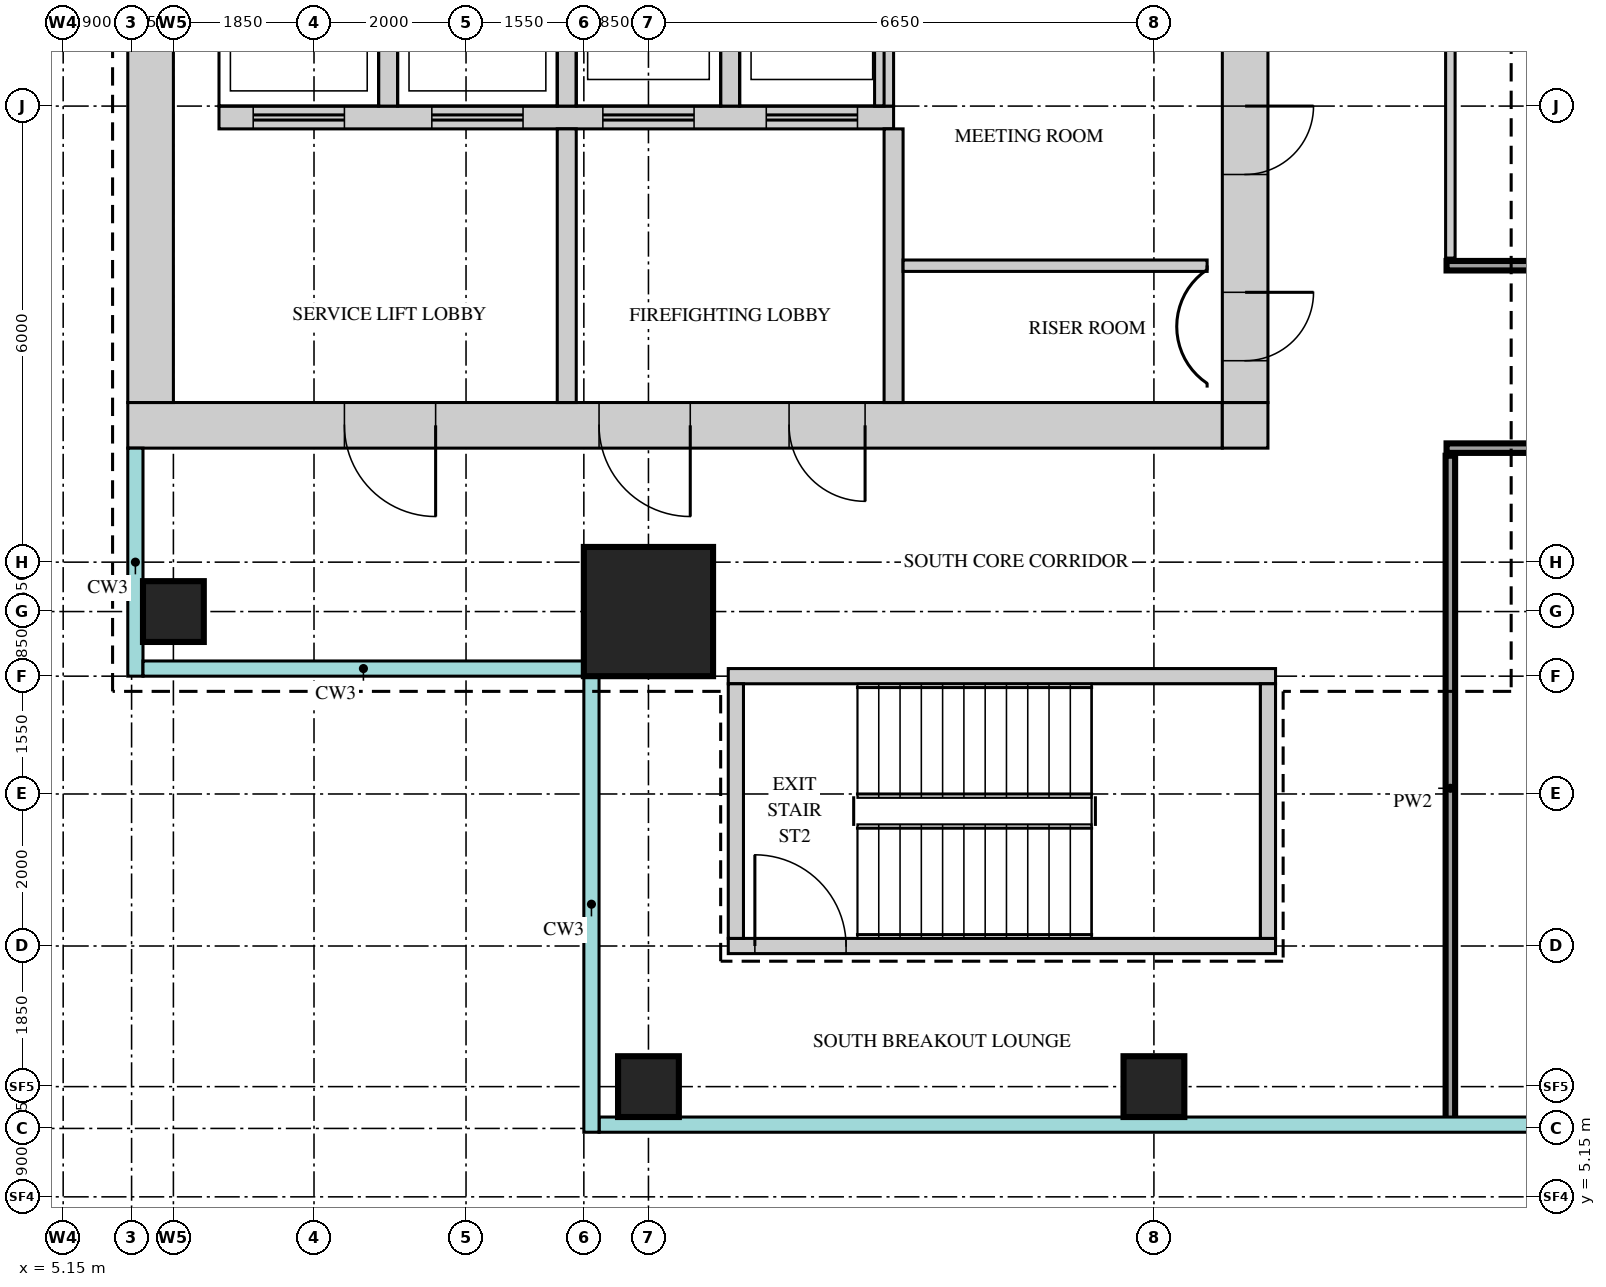
"""IFC4 building model, lengths in metres.
Left out: names, types, materials, properties, quantities, classifications, styles, units other than length and angle.
Written with IfcOpenShell. Run it as: python <this file> out.ifc"""

import sys

from ifc_helpers import new_model, si_unit, direction, frame, frame_2d, origin, origin_2d, place, context, subcontext, project, spatial, rectangle, extrude, source, transform, mapped, element, fill, save


model = new_model("IFC4")
c1 = context("Model", 3, precision=1e-05, world=origin(), true_north=direction((0.0, 1.0)))
c2 = subcontext(c1, "Body", "Model", "MODEL_VIEW")
j1 = project(units=[si_unit("LENGTHUNIT", "METRE"), si_unit("PLANEANGLEUNIT", "RADIAN")], contexts=[c1])
p1 = place(None, origin())
s1 = spatial("IfcSite", under=j1, at=p1, CompositionType="ELEMENT")
p2 = place(p1, origin())
s2 = spatial("IfcBuilding", under=s1, at=p2, CompositionType="ELEMENT")
p3 = place(p2, frame((0.0, 0.0, 314.2)))
s3 = spatial("IfcBuildingStorey", under=s2, at=p3, CompositionType="ELEMENT", Elevation=314.2)
m1 = source(origin(), c2, "Body", "SweptSolid", [
    extrude(rectangle(XDim=14.4, YDim=0.6, at=frame_2d((7.2, 0.0))), origin(), (0.0, 0.0, 1.0), 3.75),
])
p4 = place(p3, frame((6.0, 15.3, 0.0), z_axis=(0.0, 0.0, 1.0), x_axis=(1.0, 0.0, 0.0)))
e1 = element("IfcWall", 1, at=p4, inside=s3, PredefinedType="SHEAR", context=c2, shape_type="MappedRepresentation", body=[
    mapped(m1, transform((0.0, 0.0, 0.0))),
])
m2 = source(origin(), c2, "Body", "SweptSolid", [
    extrude(rectangle(XDim=1.2, YDim=2.1, at=frame_2d((0.6, 1.05))), frame((0.0, 0.31, 0.0), z_axis=(0.0, -1.0, 0.0), x_axis=(1.0, 0.0, 0.0)), (0.0, 0.0, 1.0), 0.62),
])
p5 = place(p4, frame((6.2, 0.0, 0.0)))
e2 = element("IfcOpeningElement", 2, at=p5, cuts=e1, PredefinedType="OPENING", context=c2, shape_type="MappedRepresentation", body=[
    mapped(m2, transform((0.0, 0.0, 0.0))),
])
p6 = place(p4, frame((2.85, 0.0, 0.0)))
e3 = element("IfcOpeningElement", 3, at=p6, cuts=e1, PredefinedType="OPENING", context=c2, shape_type="MappedRepresentation", body=[
    mapped(m2, transform((0.0, 0.0, 0.0))),
])
m3 = source(origin(), c2, "Body", "SweptSolid", [
    extrude(rectangle(XDim=1.0, YDim=2.1, at=frame_2d((0.5, 1.05))), frame((0.0, 0.31, 0.0), z_axis=(0.0, -1.0, 0.0), x_axis=(1.0, 0.0, 0.0)), (0.0, 0.0, 1.0), 0.62),
])
p7 = place(p4, frame((8.7, 0.0, 0.0)))
e4 = element("IfcOpeningElement", 4, at=p7, cuts=e1, PredefinedType="OPENING", context=c2, shape_type="MappedRepresentation", body=[
    mapped(m3, transform((0.0, 0.0, 0.0))),
])
m4 = source(origin(), c2, "Body", "SweptSolid", [
    extrude(rectangle(XDim=0.6, YDim=0.6, at=frame_2d((0.3, 0.0))), origin(), (0.0, 0.0, 1.0), 3.75),
])
p8 = place(p3, frame((20.4, 15.3, 0.0), z_axis=(0.0, 0.0, 1.0), x_axis=(1.0, 0.0, 0.0)))
e5 = element("IfcWall", 5, at=p8, inside=s3, PredefinedType="SHEAR", context=c2, shape_type="MappedRepresentation", body=[
    mapped(m4, transform((0.0, 0.0, 0.0))),
])
m5 = source(origin(), c2, "Body", "SweptSolid", [
    extrude(rectangle(XDim=22.8, YDim=0.6, at=frame_2d((11.4, 0.0))), origin(), (0.0, 0.0, 1.0), 3.75),
])
p9 = place(p3, frame((20.7, 15.6, 0.0), z_axis=(0.0, 0.0, 1.0), x_axis=(0.0, 1.0, 0.0)))
e6 = element("IfcWall", 6, at=p9, inside=s3, PredefinedType="SHEAR", context=c2, shape_type="MappedRepresentation", body=[
    mapped(m5, transform((0.0, 0.0, 0.0))),
])
m6 = source(origin(), c2, "Body", "SweptSolid", [
    extrude(rectangle(XDim=1.8, YDim=2.1, at=frame_2d((0.9, 1.05))), frame((0.0, 0.31, 0.0), z_axis=(0.0, -1.0, 0.0), x_axis=(1.0, 0.0, 0.0)), (0.0, 0.0, 1.0), 0.62),
])
p10 = place(p9, frame((10.9, 0.0, 0.0)))
e7 = element("IfcOpeningElement", 7, at=p10, cuts=e6, PredefinedType="OPENING", context=c2, shape_type="MappedRepresentation", body=[
    mapped(m6, transform((0.0, 0.0, 0.0))),
])
m7 = source(origin(), c2, "Body", "SweptSolid", [
    extrude(rectangle(XDim=0.9, YDim=2.1, at=frame_2d((0.45, 1.05))), frame((0.0, 0.31, 0.0), z_axis=(0.0, -1.0, 0.0), x_axis=(1.0, 0.0, 0.0)), (0.0, 0.0, 1.0), 0.62),
])
p11 = place(p9, frame((0.55, 0.0, 0.0)))
e8 = element("IfcOpeningElement", 8, at=p11, cuts=e6, PredefinedType="OPENING", context=c2, shape_type="MappedRepresentation", body=[
    mapped(m7, transform((0.0, 0.0, 0.0))),
])
p12 = place(p9, frame((3.0, 0.0, 0.0)))
e9 = element("IfcOpeningElement", 9, at=p12, cuts=e6, PredefinedType="OPENING", context=c2, shape_type="MappedRepresentation", body=[
    mapped(m7, transform((0.0, 0.0, 0.0))),
])
p13 = place(p9, frame((5.75, 0.0, 0.0)))
e10 = element("IfcOpeningElement", 10, at=p13, cuts=e6, PredefinedType="OPENING", context=c2, shape_type="MappedRepresentation", body=[
    mapped(m7, transform((0.0, 0.0, 0.0))),
])
p14 = place(p3, frame((6.3, 15.6, 0.0), z_axis=(0.0, 0.0, 1.0), x_axis=(0.0, 1.0, 0.0)))
e11 = element("IfcWall", 11, at=p14, inside=s3, PredefinedType="SHEAR", context=c2, shape_type="MappedRepresentation", body=[
    mapped(m5, transform((0.0, 0.0, 0.0))),
])
m8 = source(origin(), c2, "Body", "SweptSolid", [
    extrude(rectangle(XDim=7.2, YDim=0.2, at=frame_2d((3.6, 0.0))), origin(), (0.0, 0.0, 1.0), 3.75),
])
p15 = place(p3, frame((13.9, 12.0, 0.0), z_axis=(0.0, 0.0, 1.0), x_axis=(1.0, 0.0, 0.0)))
e12 = element("IfcWall", 12, at=p15, inside=s3, PredefinedType="SHEAR", context=c2, shape_type="MappedRepresentation", body=[
    mapped(m8, transform((0.0, 0.0, 0.0))),
])
p16 = place(p3, frame((13.9, 8.45, 0.0), z_axis=(0.0, 0.0, 1.0), x_axis=(1.0, 0.0, 0.0)))
e13 = element("IfcWall", 13, at=p16, inside=s3, PredefinedType="SHEAR", context=c2, shape_type="MappedRepresentation", body=[
    mapped(m8, transform((0.0, 0.0, 0.0))),
])
m9 = source(origin(), c2, "Body", "SweptSolid", [
    extrude(rectangle(XDim=1.2, YDim=2.1, at=frame_2d((0.6, 1.05))), frame((0.0, 0.11, 0.0), z_axis=(0.0, -1.0, 0.0), x_axis=(1.0, 0.0, 0.0)), (0.0, 0.0, 1.0), 0.22),
])
p17 = place(p16, frame((0.35, 0.0, 0.0)))
e14 = element("IfcOpeningElement", 14, at=p17, cuts=e13, PredefinedType="OPENING", context=c2, shape_type="MappedRepresentation", body=[
    mapped(m9, transform((0.0, 0.0, 0.0))),
])
m10 = source(origin(), c2, "Body", "SweptSolid", [
    extrude(rectangle(XDim=3.35, YDim=0.2, at=frame_2d((1.675, 0.0))), origin(), (0.0, 0.0, 1.0), 3.75),
])
for number, where, z_axis, x_axis in (
    (15, (21.0, 8.55, 0.0), (0.0, 0.0, 1.0), (0.0, 1.0, 0.0)),
    (16, (14.0, 8.55, 0.0), (0.0, 0.0, 1.0), (0.0, 1.0, 0.0)),
):
    element("IfcWall", number, at=place(p3, frame(where, z_axis=z_axis, x_axis=x_axis)), inside=s3, PredefinedType="SHEAR", context=c2, shape_type="MappedRepresentation", body=[
        mapped(m10, transform((0.0, 0.0, 0.0))),
    ])
m11 = source(origin(), c2, "Body", "SweptSolid", [
    extrude(rectangle(XDim=8.875, YDim=0.3, at=frame_2d((4.438, 0.0))), origin(), (0.0, 0.0, 1.0), 3.75),
])
p18 = place(p3, frame((7.2, 19.35, 0.0), z_axis=(0.0, 0.0, 1.0), x_axis=(1.0, 0.0, 0.0)))
e17 = element("IfcWall", 17, at=p18, inside=s3, PredefinedType="STANDARD", context=c2, shape_type="MappedRepresentation", body=[
    mapped(m11, transform((0.0, 0.0, 0.0))),
])
m12 = source(origin(), c2, "Body", "SweptSolid", [
    extrude(rectangle(XDim=1.2, YDim=2.1, at=frame_2d((0.6, 1.05))), frame((0.0, 0.16, 0.0), z_axis=(0.0, -1.0, 0.0), x_axis=(1.0, 0.0, 0.0)), (0.0, 0.0, 1.0), 0.32),
])
p19 = place(p18, frame((0.45, 0.0, 0.0)))
e18 = element("IfcOpeningElement", 18, at=p19, cuts=e17, PredefinedType="OPENING", context=c2, shape_type="MappedRepresentation", body=[
    mapped(m12, transform((0.0, 0.0, 0.0))),
])
p20 = place(p18, frame((2.8, 0.0, 0.0)))
e19 = element("IfcOpeningElement", 19, at=p20, cuts=e17, PredefinedType="OPENING", context=c2, shape_type="MappedRepresentation", body=[
    mapped(m12, transform((0.0, 0.0, 0.0))),
])
p21 = place(p18, frame((5.05, 0.0, 0.0)))
e20 = element("IfcOpeningElement", 20, at=p21, cuts=e17, PredefinedType="OPENING", context=c2, shape_type="MappedRepresentation", body=[
    mapped(m12, transform((0.0, 0.0, 0.0))),
])
p22 = place(p18, frame((7.2, 0.0, 0.0)))
e21 = element("IfcOpeningElement", 21, at=p22, cuts=e17, PredefinedType="OPENING", context=c2, shape_type="MappedRepresentation", body=[
    mapped(m12, transform((0.0, 0.0, 0.0))),
])
m13 = source(origin(), c2, "Body", "SweptSolid", [
    extrude(rectangle(XDim=3.1, YDim=0.25, at=frame_2d((1.55, 0.0))), origin(), (0.0, 0.0, 1.0), 3.75),
])
for number, where, z_axis, x_axis in (
    (22, (9.425, 19.5, 0.0), (0.0, 0.0, 1.0), (0.0, 1.0, 0.0)),
    (23, (11.775, 19.5, 0.0), (0.0, 0.0, 1.0), (0.0, 1.0, 0.0)),
    (24, (13.925, 19.5, 0.0), (0.0, 0.0, 1.0), (0.0, 1.0, 0.0)),
    (25, (15.95, 19.5, 0.0), (0.0, 0.0, 1.0), (0.0, 1.0, 0.0)),
):
    element("IfcWall", number, at=place(p3, frame(where, z_axis=z_axis, x_axis=x_axis)), inside=s3, PredefinedType="STANDARD", context=c2, shape_type="MappedRepresentation", body=[
        mapped(m13, transform((0.0, 0.0, 0.0))),
    ])
m14 = source(origin(), c2, "Body", "SweptSolid", [
    extrude(rectangle(XDim=3.6, YDim=0.25, at=frame_2d((1.8, 0.0))), origin(), (0.0, 0.0, 1.0), 3.75),
])
for number, where, z_axis, x_axis in (
    (26, (16.075, 15.6, 0.0), (0.0, 0.0, 1.0), (0.0, 1.0, 0.0)),
    (27, (11.775, 15.6, 0.0), (0.0, 0.0, 1.0), (0.0, 1.0, 0.0)),
):
    element("IfcWall", number, at=place(p3, frame(where, z_axis=z_axis, x_axis=x_axis)), inside=s3, PredefinedType="STANDARD", context=c2, shape_type="MappedRepresentation", body=[
        mapped(m14, transform((0.0, 0.0, 0.0))),
    ])
m15 = source(origin(), c2, "Body", "SweptSolid", [
    extrude(rectangle(XDim=1.7, YDim=1.7, at=origin_2d()), origin(), (0.0, 0.0, 1.0), 3.75),
])
p23 = place(p3, frame((12.85, 12.85, 0.0), z_axis=(0.0, 0.0, 1.0), x_axis=(1.0, 0.0, 0.0)))
e28 = element("IfcColumn", 28, at=p23, inside=s3, PredefinedType="COLUMN", context=c2, shape_type="MappedRepresentation", body=[
    mapped(m15, transform((0.0, 0.0, 0.0))),
])
m16 = source(origin(), c2, "Body", "SweptSolid", [
    extrude(rectangle(XDim=0.8, YDim=0.8, at=origin_2d()), origin(), (0.0, 0.0, 1.0), 3.75),
])
for number, where, z_axis, x_axis in (
    (29, (12.85, 6.6, 0.0), (0.0, 0.0, 1.0), (1.0, 0.0, 0.0)),
    (30, (19.5, 6.6, 0.0), (0.0, 0.0, 1.0), (1.0, 0.0, 0.0)),
    (31, (6.6, 12.85, 0.0), (0.0, 0.0, 1.0), (1.0, 0.0, 0.0)),
):
    element("IfcColumn", number, at=place(p3, frame(where, z_axis=z_axis, x_axis=x_axis)), inside=s3, PredefinedType="COLUMN", context=c2, shape_type="MappedRepresentation", body=[
        mapped(m16, transform((0.0, 0.0, 0.0))),
    ])
m17 = source(origin(), c2, "Body", "SweptSolid", [
    extrude(rectangle(XDim=8.75, YDim=0.125, at=frame_2d((4.375, 0.0))), origin(), (0.0, 0.0, 1.0), 3.8),
])
p24 = place(p3, frame((23.4, 6.15, 0.0), z_axis=(0.0, 0.0, 1.0), x_axis=(0.0, 1.0, 0.0)))
e32 = element("IfcWall", 32, at=p24, inside=s3, PredefinedType="PARTITIONING", context=c2, shape_type="MappedRepresentation", body=[
    mapped(m17, transform((0.0, 0.0, 0.0))),
])
m18 = source(origin(), c2, "Body", "SweptSolid", [
    extrude(rectangle(XDim=19.1, YDim=0.125, at=frame_2d((9.55, 0.0))), origin(), (0.0, 0.0, 1.0), 3.8),
])
p25 = place(p3, frame((23.35, 15.0, 0.0), z_axis=(0.0, 0.0, 1.0), x_axis=(1.0, 0.0, 0.0)))
e33 = element("IfcWall", 33, at=p25, inside=s3, PredefinedType="PARTITIONING", context=c2, shape_type="MappedRepresentation", body=[
    mapped(m18, transform((0.0, 0.0, 0.0))),
])
m19 = source(origin(), c2, "Body", "SweptSolid", [
    extrude(rectangle(XDim=1.2, YDim=2.1, at=frame_2d((0.6, 1.05))), frame((0.0, 0.073, 0.0), z_axis=(0.0, -1.0, 0.0), x_axis=(1.0, 0.0, 0.0)), (0.0, 0.0, 1.0), 0.145),
])
p26 = place(p25, frame((7.75, 0.0, 0.0)))
e34 = element("IfcOpeningElement", 34, at=p26, cuts=e33, PredefinedType="OPENING", context=c2, shape_type="MappedRepresentation", body=[
    mapped(m19, transform((0.0, 0.0, 0.0))),
])
m20 = source(origin(), c2, "Body", "SweptSolid", [
    extrude(rectangle(XDim=4.0, YDim=0.15, at=frame_2d((2.0, 0.0))), origin(), (0.0, 0.0, 1.0), 3.8),
])
p27 = place(p3, frame((16.2, 17.4, 0.0), z_axis=(0.0, 0.0, 1.0), x_axis=(1.0, 0.0, 0.0)))
e35 = element("IfcWall", 35, at=p27, inside=s3, PredefinedType="PARTITIONING", context=c2, shape_type="MappedRepresentation", body=[
    mapped(m20, transform((0.0, 0.0, 0.0))),
])
m21 = source(origin(), c2, "Body", "SweptSolid", [
    extrude(rectangle(XDim=16.7, YDim=0.125, at=frame_2d((8.35, 0.0))), origin(), (0.0, 0.0, 1.0), 3.8),
])
p28 = place(p3, frame((23.35, 17.4, 0.0), z_axis=(0.0, 0.0, 1.0), x_axis=(1.0, 0.0, 0.0)))
e36 = element("IfcWall", 36, at=p28, inside=s3, PredefinedType="PARTITIONING", context=c2, shape_type="MappedRepresentation", body=[
    mapped(m21, transform((0.0, 0.0, 0.0))),
])
p29 = place(p28, frame((7.75, 0.0, 0.0)))
e37 = element("IfcOpeningElement", 37, at=p29, cuts=e36, PredefinedType="OPENING", context=c2, shape_type="MappedRepresentation", body=[
    mapped(m19, transform((0.0, 0.0, 0.0))),
])
m22 = source(origin(), c2, "Body", "SweptSolid", [
    extrude(rectangle(XDim=19.0, YDim=0.125, at=frame_2d((9.5, 0.0))), origin(), (0.0, 0.0, 1.0), 3.8),
])
p30 = place(p3, frame((23.4, 17.5, 0.0), z_axis=(0.0, 0.0, 1.0), x_axis=(0.0, 1.0, 0.0)))
e38 = element("IfcWall", 38, at=p30, inside=s3, PredefinedType="PARTITIONING", context=c2, shape_type="MappedRepresentation", body=[
    mapped(m22, transform((0.0, 0.0, 0.0))),
])
m23 = source(origin(), c2, "Body", "SweptSolid", [
    extrude(rectangle(XDim=0.9, YDim=2.1, at=frame_2d((0.45, 1.05))), frame((0.0, 0.073, 0.0), z_axis=(0.0, -1.0, 0.0), x_axis=(1.0, 0.0, 0.0)), (0.0, 0.0, 1.0), 0.145),
])
p31 = place(p30, frame((10.4, 0.0, 0.0)))
e39 = element("IfcOpeningElement", 39, at=p31, cuts=e38, PredefinedType="OPENING", context=c2, shape_type="MappedRepresentation", body=[
    mapped(m23, transform((0.0, 0.0, 0.0))),
])
m24 = source(origin(), c2, "Body", "SweptSolid", [
    extrude(rectangle(XDim=0.9, YDim=2.1, at=frame_2d((0.45, 1.05))), frame((0.0, 0.25, 0.0), z_axis=(0.0, -1.0, 0.0), x_axis=(1.0, 0.0, 0.0)), (0.0, 0.0, 1.0), 0.5),
])
p32 = place(p11, origin())
e40 = element("IfcDoor", 40, at=p32, inside=s3, OperationType="SINGLE_SWING_RIGHT", PredefinedType="DOOR", context=c2, shape_type="MappedRepresentation", body=[
    mapped(m24, transform((0.0, 0.0, 0.0))),
])
fill(e8, e40)
p33 = place(p12, origin())
e41 = element("IfcDoor", 41, at=p33, inside=s3, OperationType="SINGLE_SWING_RIGHT", PredefinedType="DOOR", context=c2, shape_type="MappedRepresentation", body=[
    mapped(m24, transform((0.0, 0.0, 0.0))),
])
fill(e9, e41)
m25 = source(origin(), c2, "Body", "SweptSolid", [
    extrude(rectangle(XDim=1.2, YDim=2.1, at=frame_2d((0.6, 1.05))), frame((0.0, 0.25, 0.0), z_axis=(0.0, -1.0, 0.0), x_axis=(1.0, 0.0, 0.0)), (0.0, 0.0, 1.0), 0.5),
])
p34 = place(p5, origin())
e42 = element("IfcDoor", 42, at=p34, inside=s3, OperationType="SINGLE_SWING_RIGHT", PredefinedType="DOOR", context=c2, shape_type="MappedRepresentation", body=[
    mapped(m25, transform((0.0, 0.0, 0.0))),
])
fill(e2, e42)
p35 = place(p6, origin())
e43 = element("IfcDoor", 43, at=p35, inside=s3, OperationType="SINGLE_SWING_RIGHT", PredefinedType="DOOR", context=c2, shape_type="MappedRepresentation", body=[
    mapped(m25, transform((0.0, 0.0, 0.0))),
])
fill(e3, e43)
m26 = source(origin(), c2, "Body", "SweptSolid", [
    extrude(rectangle(XDim=1.0, YDim=2.1, at=frame_2d((0.5, 1.05))), frame((0.0, 0.25, 0.0), z_axis=(0.0, -1.0, 0.0), x_axis=(1.0, 0.0, 0.0)), (0.0, 0.0, 1.0), 0.5),
])
p36 = place(p7, origin())
e44 = element("IfcDoor", 44, at=p36, inside=s3, OperationType="SINGLE_SWING_RIGHT", PredefinedType="DOOR", context=c2, shape_type="MappedRepresentation", body=[
    mapped(m26, transform((0.0, 0.0, 0.0))),
])
fill(e4, e44)
m27 = source(origin(), c2, "Body", "SweptSolid", [
    extrude(rectangle(XDim=1.2, YDim=2.1, at=frame_2d((0.6, 1.05))), frame((0.0, 0.025, 0.0), z_axis=(0.0, -1.0, 0.0), x_axis=(1.0, 0.0, 0.0)), (0.0, 0.0, 1.0), 0.05),
])
p37 = place(p17, origin())
e45 = element("IfcDoor", 45, at=p37, inside=s3, OperationType="SINGLE_SWING_RIGHT", PredefinedType="DOOR", context=c2, shape_type="MappedRepresentation", body=[
    mapped(m27, transform((0.0, 0.0, 0.0))),
])
fill(e14, e45)
p38 = place(p19, origin())
e46 = element("IfcDoor", 46, at=p38, inside=s3, OperationType="DOUBLE_DOOR_SLIDING", PredefinedType="DOOR", context=c2, shape_type="MappedRepresentation", body=[
    mapped(m27, transform((0.0, 0.0, 0.0))),
])
fill(e18, e46)
p39 = place(p20, origin())
e47 = element("IfcDoor", 47, at=p39, inside=s3, OperationType="DOUBLE_DOOR_SLIDING", PredefinedType="DOOR", context=c2, shape_type="MappedRepresentation", body=[
    mapped(m27, transform((0.0, 0.0, 0.0))),
])
fill(e19, e47)
p40 = place(p21, origin())
e48 = element("IfcDoor", 48, at=p40, inside=s3, OperationType="DOUBLE_DOOR_SLIDING", PredefinedType="DOOR", context=c2, shape_type="MappedRepresentation", body=[
    mapped(m27, transform((0.0, 0.0, 0.0))),
])
fill(e20, e48)
p41 = place(p22, origin())
e49 = element("IfcDoor", 49, at=p41, inside=s3, OperationType="DOUBLE_DOOR_SLIDING", PredefinedType="DOOR", context=c2, shape_type="MappedRepresentation", body=[
    mapped(m27, transform((0.0, 0.0, 0.0))),
])
fill(e21, e49)
save(model, sys.argv[1])
